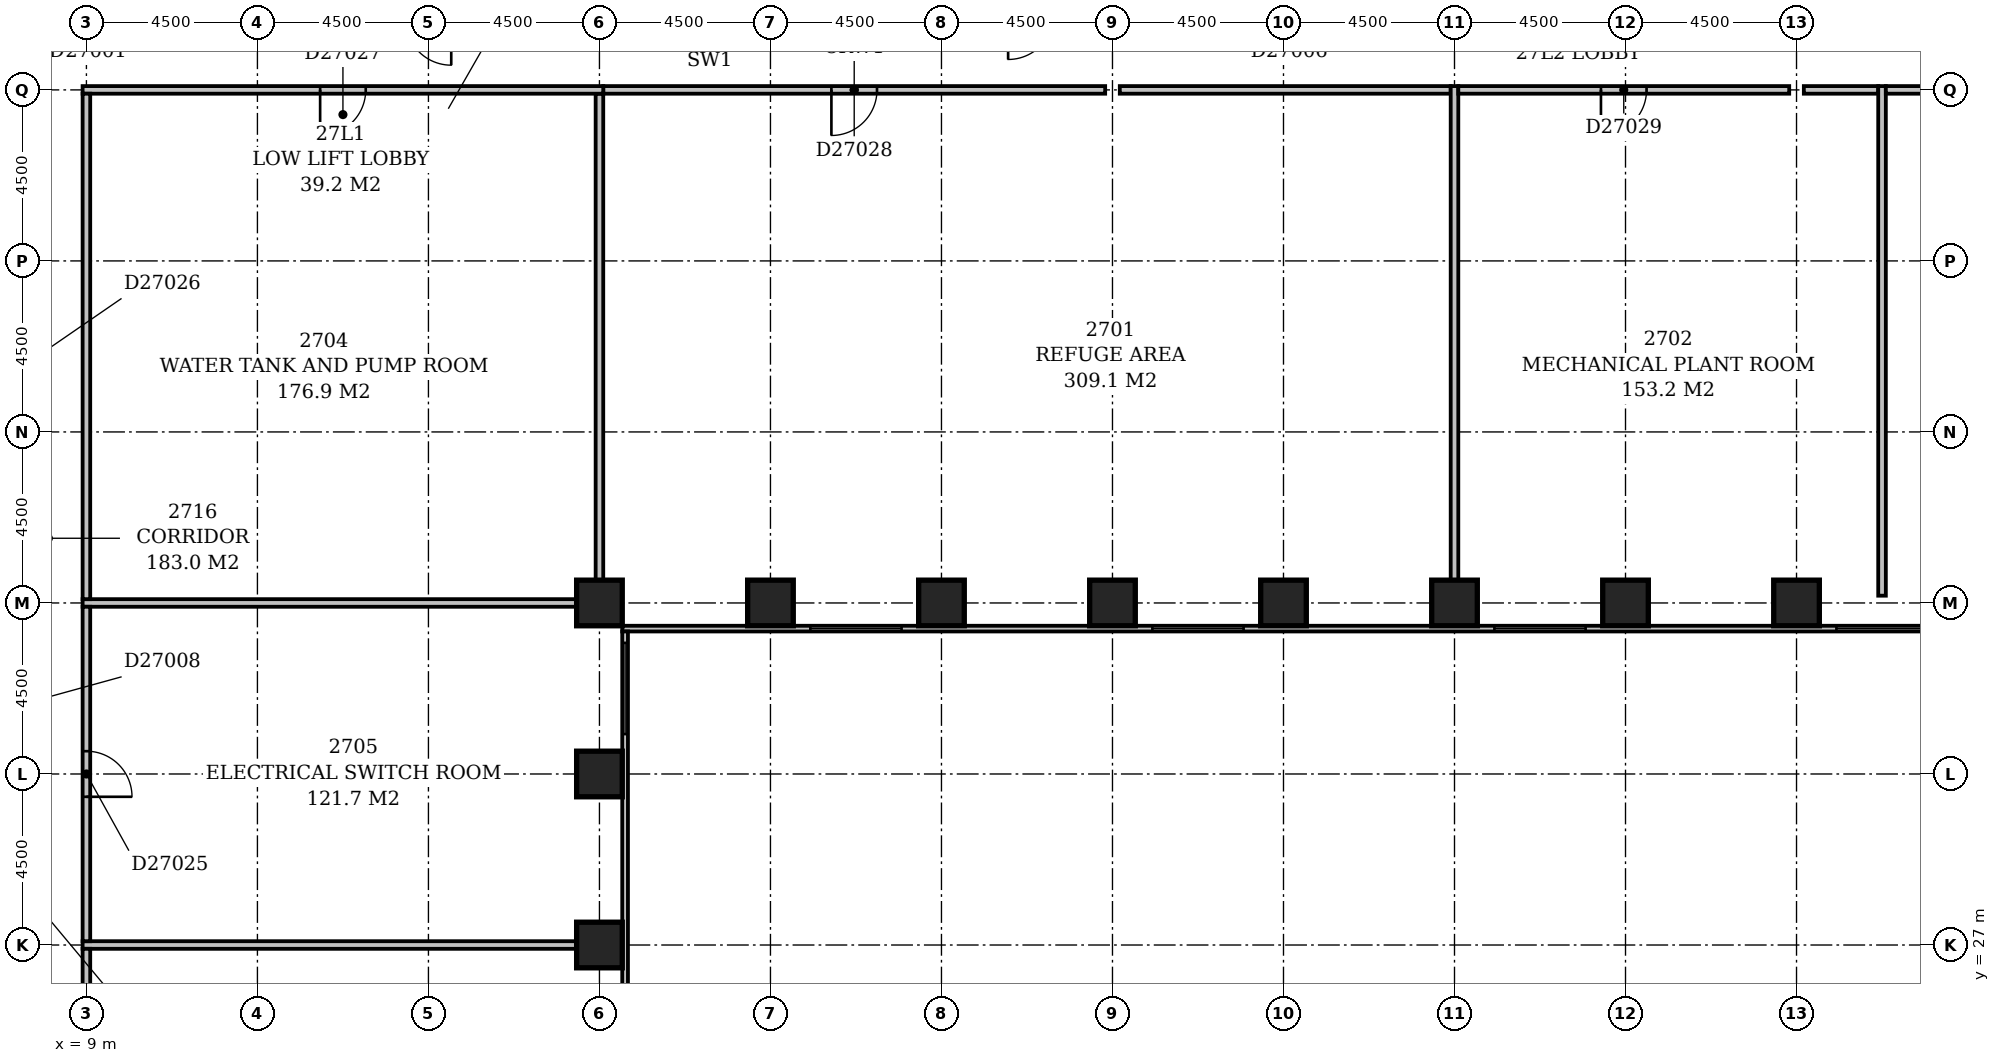
"""IFC4 building model, lengths in metres.
Left out: names, types, materials, properties, quantities, classifications, styles, units other than length and angle.
Written with IfcOpenShell. Run it as: python <this file> out.ifc"""

import sys

from ifc_helpers import new_model, si_unit, direction, frame, frame_2d, origin, origin_2d, place, context, subcontext, project, spatial, rectangle, extrude, element, fill, save


model = new_model("IFC4")
c1 = context("Model", 3, precision=1e-05, world=origin(), true_north=direction((0.0, 1.0)))
c2 = subcontext(c1, "Body", "Model", "MODEL_VIEW")
j1 = project(units=[si_unit("LENGTHUNIT", "METRE"), si_unit("PLANEANGLEUNIT", "RADIAN")], contexts=[c1])
p1 = place(None, origin())
s1 = spatial("IfcSite", under=j1, at=p1, CompositionType="ELEMENT")
p2 = place(p1, origin())
s2 = spatial("IfcBuilding", under=s1, at=p2, CompositionType="ELEMENT")
p3 = place(p2, frame((0.0, 0.0, 108.2)))
s3 = spatial("IfcBuildingStorey", under=s2, at=p3, CompositionType="ELEMENT", Elevation=108.2)
for number, where, z_axis, x_axis in (
    (1, (22.5, 27.0, -0.45), (0.0, 0.0, 1.0), (1.0, 0.0, 0.0)),
    (2, (22.5, 31.5, -0.45), (0.0, 0.0, 1.0), (1.0, 0.0, 0.0)),
    (3, (22.5, 36.0, -0.45), (0.0, 0.0, 1.0), (1.0, 0.0, 0.0)),
    (4, (27.0, 36.0, -0.45), (0.0, 0.0, 1.0), (1.0, 0.0, 0.0)),
    (5, (31.5, 36.0, -0.45), (0.0, 0.0, 1.0), (1.0, 0.0, 0.0)),
    (6, (36.0, 36.0, -0.45), (0.0, 0.0, 1.0), (1.0, 0.0, 0.0)),
    (7, (40.5, 36.0, -0.45), (0.0, 0.0, 1.0), (1.0, 0.0, 0.0)),
    (8, (45.0, 36.0, -0.45), (0.0, 0.0, 1.0), (1.0, 0.0, 0.0)),
    (9, (49.5, 36.0, -0.45), (0.0, 0.0, 1.0), (1.0, 0.0, 0.0)),
    (10, (54.0, 36.0, -0.45), (0.0, 0.0, 1.0), (1.0, 0.0, 0.0)),
):
    element("IfcColumn", number, at=place(p3, frame(where, z_axis=z_axis, x_axis=x_axis)), inside=s3, PredefinedType="COLUMN", context=c2, shape_type="SweptSolid", body=[
        extrude(rectangle(XDim=1.2, YDim=1.2, at=origin_2d()), origin(), (0.0, 0.0, 1.0), 5.35),
    ])
p4 = place(p3, frame((23.175, 17.4, 0.0), z_axis=(0.0, 0.0, 1.0), x_axis=(0.0, 1.0, 0.0)))
e11 = element("IfcWall", 11, at=p4, inside=s3, PredefinedType="STANDARD", context=c2, shape_type="SweptSolid", body=[
    extrude(rectangle(XDim=17.85, YDim=0.15, at=frame_2d((8.925, 0.0))), origin(), (0.0, 0.0, 1.0), 4.3),
])
p5 = place(p4, frame((6.15, 0.0, 0.6)))
e12 = element("IfcOpeningElement", 12, at=p5, cuts=e11, PredefinedType="OPENING", context=c2, shape_type="SweptSolid", body=[
    extrude(rectangle(XDim=2.4, YDim=2.4, at=frame_2d((1.2, 1.2))), frame((0.0, 0.087, 0.0), z_axis=(0.0, -1.0, 0.0), x_axis=(1.0, 0.0, 0.0)), (0.0, 0.0, 1.0), 0.174),
])
p6 = place(p4, frame((15.15, 0.0, 0.6)))
e13 = element("IfcOpeningElement", 13, at=p6, cuts=e11, PredefinedType="OPENING", context=c2, shape_type="SweptSolid", body=[
    extrude(rectangle(XDim=2.4, YDim=2.4, at=frame_2d((1.2, 1.2))), frame((0.0, 0.087, 0.0), z_axis=(0.0, -1.0, 0.0), x_axis=(1.0, 0.0, 0.0)), (0.0, 0.0, 1.0), 0.174),
])
p7 = place(p3, frame((23.1, 35.325, 0.0), z_axis=(0.0, 0.0, 1.0), x_axis=(1.0, 0.0, 0.0)))
e14 = element("IfcWall", 14, at=p7, inside=s3, PredefinedType="STANDARD", context=c2, shape_type="SweptSolid", body=[
    extrude(rectangle(XDim=45.15, YDim=0.15, at=frame_2d((22.575, 0.0))), origin(), (0.0, 0.0, 1.0), 4.3),
])
p8 = place(p7, frame((4.95, 0.0, 0.6)))
e15 = element("IfcOpeningElement", 15, at=p8, cuts=e14, PredefinedType="OPENING", context=c2, shape_type="SweptSolid", body=[
    extrude(rectangle(XDim=2.4, YDim=2.4, at=frame_2d((1.2, 1.2))), frame((0.0, 0.087, 0.0), z_axis=(0.0, -1.0, 0.0), x_axis=(1.0, 0.0, 0.0)), (0.0, 0.0, 1.0), 0.174),
])
p9 = place(p7, frame((13.95, 0.0, 0.6)))
e16 = element("IfcOpeningElement", 16, at=p9, cuts=e14, PredefinedType="OPENING", context=c2, shape_type="SweptSolid", body=[
    extrude(rectangle(XDim=2.4, YDim=2.4, at=frame_2d((1.2, 1.2))), frame((0.0, 0.087, 0.0), z_axis=(0.0, -1.0, 0.0), x_axis=(1.0, 0.0, 0.0)), (0.0, 0.0, 1.0), 0.174),
])
p10 = place(p7, frame((22.95, 0.0, 0.6)))
e17 = element("IfcOpeningElement", 17, at=p10, cuts=e14, PredefinedType="OPENING", context=c2, shape_type="SweptSolid", body=[
    extrude(rectangle(XDim=2.4, YDim=2.4, at=frame_2d((1.2, 1.2))), frame((0.0, 0.087, 0.0), z_axis=(0.0, -1.0, 0.0), x_axis=(1.0, 0.0, 0.0)), (0.0, 0.0, 1.0), 0.174),
])
p11 = place(p7, frame((31.95, 0.0, 0.6)))
e18 = element("IfcOpeningElement", 18, at=p11, cuts=e14, PredefinedType="OPENING", context=c2, shape_type="SweptSolid", body=[
    extrude(rectangle(XDim=2.4, YDim=2.4, at=frame_2d((1.2, 1.2))), frame((0.0, 0.087, 0.0), z_axis=(0.0, -1.0, 0.0), x_axis=(1.0, 0.0, 0.0)), (0.0, 0.0, 1.0), 0.174),
])
p12 = place(p7, frame((40.95, 0.0, 0.6)))
e19 = element("IfcOpeningElement", 19, at=p12, cuts=e14, PredefinedType="OPENING", context=c2, shape_type="SweptSolid", body=[
    extrude(rectangle(XDim=2.4, YDim=2.4, at=frame_2d((1.2, 1.2))), frame((0.0, 0.087, 0.0), z_axis=(0.0, -1.0, 0.0), x_axis=(1.0, 0.0, 0.0)), (0.0, 0.0, 1.0), 0.174),
])
p13 = place(p3, frame((9.0, 18.49, 0.0), z_axis=(0.0, 0.0, 1.0), x_axis=(0.0, 1.0, 0.0)))
e20 = element("IfcWall", 20, at=p13, inside=s3, PredefinedType="PARTITIONING", context=c2, shape_type="SweptSolid", body=[
    extrude(rectangle(XDim=8.409, YDim=0.2, at=frame_2d((4.205, 0.0))), origin(), (0.0, 0.0, 1.0), 4.9),
])
p14 = place(p13, frame((3.605, 0.0, 0.0)))
e21 = element("IfcOpeningElement", 21, at=p14, cuts=e20, PredefinedType="OPENING", context=c2, shape_type="SweptSolid", body=[
    extrude(rectangle(XDim=1.2, YDim=2.1, at=frame_2d((0.6, 1.05))), frame((0.0, 0.112, 0.0), z_axis=(0.0, -1.0, 0.0), x_axis=(1.0, 0.0, 0.0)), (0.0, 0.0, 1.0), 0.224),
])
p15 = place(p3, frame((9.0, 27.1, 0.0), z_axis=(0.0, 0.0, 1.0), x_axis=(0.0, 1.0, 0.0)))
e22 = element("IfcWall", 22, at=p15, inside=s3, PredefinedType="PARTITIONING", context=c2, shape_type="SweptSolid", body=[
    extrude(rectangle(XDim=8.8, YDim=0.2, at=frame_2d((4.4, 0.0))), origin(), (0.0, 0.0, 1.0), 4.9),
])
p16 = place(p15, frame((3.8, 0.0, 0.0)))
e23 = element("IfcOpeningElement", 23, at=p16, cuts=e22, PredefinedType="OPENING", context=c2, shape_type="SweptSolid", body=[
    extrude(rectangle(XDim=1.2, YDim=2.1, at=frame_2d((0.6, 1.05))), frame((0.0, 0.112, 0.0), z_axis=(0.0, -1.0, 0.0), x_axis=(1.0, 0.0, 0.0)), (0.0, 0.0, 1.0), 0.224),
])
p17 = place(p3, frame((22.309, 27.0, 0.0), z_axis=(0.0, 0.0, 1.0), x_axis=(-1.0, 0.0, 0.0)))
e24 = element("IfcWall", 24, at=p17, inside=s3, PredefinedType="PARTITIONING", context=c2, shape_type="SweptSolid", body=[
    extrude(rectangle(XDim=13.409, YDim=0.2, at=frame_2d((6.704, 0.0))), origin(), (0.0, 0.0, 1.0), 4.3),
])
p18 = place(p3, frame((9.0, 36.1, 0.0), z_axis=(0.0, 0.0, 1.0), x_axis=(0.0, 1.0, 0.0)))
e25 = element("IfcWall", 25, at=p18, inside=s3, PredefinedType="PARTITIONING", context=c2, shape_type="SweptSolid", body=[
    extrude(rectangle(XDim=13.3, YDim=0.2, at=frame_2d((6.65, 0.0))), origin(), (0.0, 0.0, 1.0), 4.9),
])
p19 = place(p3, frame((22.309, 36.0, 0.0), z_axis=(0.0, 0.0, 1.0), x_axis=(-1.0, 0.0, 0.0)))
e26 = element("IfcWall", 26, at=p19, inside=s3, PredefinedType="PARTITIONING", context=c2, shape_type="SweptSolid", body=[
    extrude(rectangle(XDim=13.409, YDim=0.2, at=frame_2d((6.704, 0.0))), origin(), (0.0, 0.0, 1.0), 4.9),
])
p20 = place(p3, frame((22.5, 36.191, 0.0), z_axis=(0.0, 0.0, 1.0), x_axis=(0.0, 1.0, 0.0)))
e27 = element("IfcWall", 27, at=p20, inside=s3, PredefinedType="PARTITIONING", context=c2, shape_type="SweptSolid", body=[
    extrude(rectangle(XDim=13.208, YDim=0.2, at=frame_2d((6.604, 0.0))), origin(), (0.0, 0.0, 1.0), 4.9),
])
p21 = place(p3, frame((8.9, 49.5, 0.0), z_axis=(0.0, 0.0, 1.0), x_axis=(1.0, 0.0, 0.0)))
e28 = element("IfcWall", 28, at=p21, inside=s3, PredefinedType="PARTITIONING", context=c2, shape_type="SweptSolid", body=[
    extrude(rectangle(XDim=13.7, YDim=0.2, at=frame_2d((6.85, 0.0))), origin(), (0.0, 0.0, 1.0), 4.9),
])
p22 = place(p21, frame((6.25, 0.0, 0.0)))
e29 = element("IfcOpeningElement", 29, at=p22, cuts=e28, PredefinedType="OPENING", context=c2, shape_type="SweptSolid", body=[
    extrude(rectangle(XDim=1.2, YDim=2.1, at=frame_2d((0.6, 1.05))), frame((0.0, 0.112, 0.0), z_axis=(0.0, -1.0, 0.0), x_axis=(1.0, 0.0, 0.0)), (0.0, 0.0, 1.0), 0.224),
])
p23 = place(p3, frame((22.6, 49.5, 0.0), z_axis=(0.0, 0.0, 1.0), x_axis=(1.0, 0.0, 0.0)))
e30 = element("IfcWall", 30, at=p23, inside=s3, PredefinedType="PARTITIONING", context=c2, shape_type="SweptSolid", body=[
    extrude(rectangle(XDim=13.208, YDim=0.2, at=frame_2d((6.604, 0.0))), origin(), (0.0, 0.0, 1.0), 4.9),
])
p24 = place(p23, frame((6.004, 0.0, 0.0)))
e31 = element("IfcOpeningElement", 31, at=p24, cuts=e30, PredefinedType="OPENING", context=c2, shape_type="SweptSolid", body=[
    extrude(rectangle(XDim=1.2, YDim=2.1, at=frame_2d((0.6, 1.05))), frame((0.0, 0.112, 0.0), z_axis=(0.0, -1.0, 0.0), x_axis=(1.0, 0.0, 0.0)), (0.0, 0.0, 1.0), 0.224),
])
p25 = place(p3, frame((36.192, 49.5, 0.0), z_axis=(0.0, 0.0, 1.0), x_axis=(1.0, 0.0, 0.0)))
e32 = element("IfcWall", 32, at=p25, inside=s3, PredefinedType="PARTITIONING", context=c2, shape_type="SweptSolid", body=[
    extrude(rectangle(XDim=8.708, YDim=0.2, at=frame_2d((4.354, 0.0))), origin(), (0.0, 0.0, 1.0), 4.9),
])
p26 = place(p3, frame((45.0, 49.6, 0.0), z_axis=(0.0, 0.0, 1.0), x_axis=(0.0, -1.0, 0.0)))
e33 = element("IfcWall", 33, at=p26, inside=s3, PredefinedType="PARTITIONING", context=c2, shape_type="SweptSolid", body=[
    extrude(rectangle(XDim=13.409, YDim=0.2, at=frame_2d((6.704, 0.0))), origin(), (0.0, 0.0, 1.0), 4.2),
])
p27 = place(p3, frame((45.1, 49.5, 0.0), z_axis=(0.0, 0.0, 1.0), x_axis=(1.0, 0.0, 0.0)))
e34 = element("IfcWall", 34, at=p27, inside=s3, PredefinedType="PARTITIONING", context=c2, shape_type="SweptSolid", body=[
    extrude(rectangle(XDim=8.708, YDim=0.2, at=frame_2d((4.354, 0.0))), origin(), (0.0, 0.0, 1.0), 4.9),
])
p28 = place(p27, frame((3.754, 0.0, 0.0)))
e35 = element("IfcOpeningElement", 35, at=p28, cuts=e34, PredefinedType="OPENING", context=c2, shape_type="SweptSolid", body=[
    extrude(rectangle(XDim=1.2, YDim=2.1, at=frame_2d((0.6, 1.05))), frame((0.0, 0.112, 0.0), z_axis=(0.0, -1.0, 0.0), x_axis=(1.0, 0.0, 0.0)), (0.0, 0.0, 1.0), 0.224),
])
p29 = place(p3, frame((54.192, 49.5, 0.0), z_axis=(0.0, 0.0, 1.0), x_axis=(1.0, 0.0, 0.0)))
e36 = element("IfcWall", 36, at=p29, inside=s3, PredefinedType="PARTITIONING", context=c2, shape_type="SweptSolid", body=[
    extrude(rectangle(XDim=1.958, YDim=0.2, at=frame_2d((0.979, 0.0))), origin(), (0.0, 0.0, 1.0), 4.9),
])
p30 = place(p3, frame((56.25, 49.6, 0.0), z_axis=(0.0, 0.0, 1.0), x_axis=(0.0, -1.0, 0.0)))
e37 = element("IfcWall", 37, at=p30, inside=s3, PredefinedType="PARTITIONING", context=c2, shape_type="SweptSolid", body=[
    extrude(rectangle(XDim=13.409, YDim=0.2, at=frame_2d((6.704, 0.0))), origin(), (0.0, 0.0, 1.0), 4.9),
])
p31 = place(p3, frame((56.35, 49.5, 0.0), z_axis=(0.0, 0.0, 1.0), x_axis=(1.0, 0.0, 0.0)))
e38 = element("IfcWall", 38, at=p31, inside=s3, PredefinedType="PARTITIONING", context=c2, shape_type="SweptSolid", body=[
    extrude(rectangle(XDim=10.958, YDim=0.2, at=frame_2d((5.479, 0.0))), origin(), (0.0, 0.0, 1.0), 4.9),
])
p32 = place(p31, frame((4.829, 0.0, 0.0)))
e39 = element("IfcOpeningElement", 39, at=p32, cuts=e38, PredefinedType="OPENING", context=c2, shape_type="SweptSolid", body=[
    extrude(rectangle(XDim=1.2, YDim=2.1, at=frame_2d((0.6, 1.05))), frame((0.0, 0.112, 0.0), z_axis=(0.0, -1.0, 0.0), x_axis=(1.0, 0.0, 0.0)), (0.0, 0.0, 1.0), 0.224),
])
p33 = place(p6, origin())
e40 = element("IfcWindow", 40, at=p33, inside=s3, PartitioningType="SINGLE_PANEL", PredefinedType="USERDEFINED", context=c2, shape_type="SweptSolid", body=[
    extrude(rectangle(XDim=2.4, YDim=2.4, at=frame_2d((1.2, 1.2))), frame((0.0, 0.03, 0.0), z_axis=(0.0, -1.0, 0.0), x_axis=(1.0, 0.0, 0.0)), (0.0, 0.0, 1.0), 0.06),
])
fill(e13, e40)
p34 = place(p8, origin())
e41 = element("IfcWindow", 41, at=p34, inside=s3, PartitioningType="SINGLE_PANEL", PredefinedType="USERDEFINED", context=c2, shape_type="SweptSolid", body=[
    extrude(rectangle(XDim=2.4, YDim=2.4, at=frame_2d((1.2, 1.2))), frame((0.0, 0.03, 0.0), z_axis=(0.0, -1.0, 0.0), x_axis=(1.0, 0.0, 0.0)), (0.0, 0.0, 1.0), 0.06),
])
fill(e15, e41)
p35 = place(p9, origin())
e42 = element("IfcWindow", 42, at=p35, inside=s3, PartitioningType="SINGLE_PANEL", PredefinedType="USERDEFINED", context=c2, shape_type="SweptSolid", body=[
    extrude(rectangle(XDim=2.4, YDim=2.4, at=frame_2d((1.2, 1.2))), frame((0.0, 0.03, 0.0), z_axis=(0.0, -1.0, 0.0), x_axis=(1.0, 0.0, 0.0)), (0.0, 0.0, 1.0), 0.06),
])
fill(e16, e42)
p36 = place(p10, origin())
e43 = element("IfcWindow", 43, at=p36, inside=s3, PartitioningType="SINGLE_PANEL", PredefinedType="USERDEFINED", context=c2, shape_type="SweptSolid", body=[
    extrude(rectangle(XDim=2.4, YDim=2.4, at=frame_2d((1.2, 1.2))), frame((0.0, 0.03, 0.0), z_axis=(0.0, -1.0, 0.0), x_axis=(1.0, 0.0, 0.0)), (0.0, 0.0, 1.0), 0.06),
])
fill(e17, e43)
p37 = place(p11, origin())
e44 = element("IfcWindow", 44, at=p37, inside=s3, PartitioningType="SINGLE_PANEL", PredefinedType="USERDEFINED", context=c2, shape_type="SweptSolid", body=[
    extrude(rectangle(XDim=2.4, YDim=2.4, at=frame_2d((1.2, 1.2))), frame((0.0, 0.03, 0.0), z_axis=(0.0, -1.0, 0.0), x_axis=(1.0, 0.0, 0.0)), (0.0, 0.0, 1.0), 0.06),
])
fill(e18, e44)
p38 = place(p16, frame((1.2, 0.0, 0.0), z_axis=(0.0, 0.0, 1.0), x_axis=(-1.0, 0.0, 0.0)))
e45 = element("IfcDoor", 45, at=p38, inside=s3, OperationType="SINGLE_SWING_RIGHT", PredefinedType="DOOR", context=c2, shape_type="SweptSolid", body=[
    extrude(rectangle(XDim=1.2, YDim=2.1, at=frame_2d((0.6, 1.05))), frame((0.0, 0.025, 0.0), z_axis=(0.0, -1.0, 0.0), x_axis=(1.0, 0.0, 0.0)), (0.0, 0.0, 1.0), 0.05),
])
fill(e23, e45)
p39 = place(p22, frame((1.2, 0.0, 0.0), z_axis=(0.0, 0.0, 1.0), x_axis=(-1.0, 0.0, 0.0)))
e46 = element("IfcDoor", 46, at=p39, inside=s3, OperationType="SINGLE_SWING_RIGHT", PredefinedType="DOOR", context=c2, shape_type="SweptSolid", body=[
    extrude(rectangle(XDim=1.2, YDim=2.1, at=frame_2d((0.6, 1.05))), frame((0.0, 0.025, 0.0), z_axis=(0.0, -1.0, 0.0), x_axis=(1.0, 0.0, 0.0)), (0.0, 0.0, 1.0), 0.05),
])
fill(e29, e46)
p40 = place(p24, frame((1.2, 0.0, 0.0), z_axis=(0.0, 0.0, 1.0), x_axis=(-1.0, 0.0, 0.0)))
e47 = element("IfcDoor", 47, at=p40, inside=s3, OperationType="SINGLE_SWING_RIGHT", PredefinedType="DOOR", context=c2, shape_type="SweptSolid", body=[
    extrude(rectangle(XDim=1.2, YDim=2.1, at=frame_2d((0.6, 1.05))), frame((0.0, 0.025, 0.0), z_axis=(0.0, -1.0, 0.0), x_axis=(1.0, 0.0, 0.0)), (0.0, 0.0, 1.0), 0.05),
])
fill(e31, e47)
p41 = place(p28, frame((1.2, 0.0, 0.0), z_axis=(0.0, 0.0, 1.0), x_axis=(-1.0, 0.0, 0.0)))
e48 = element("IfcDoor", 48, at=p41, inside=s3, OperationType="SINGLE_SWING_RIGHT", PredefinedType="DOOR", context=c2, shape_type="SweptSolid", body=[
    extrude(rectangle(XDim=1.2, YDim=2.1, at=frame_2d((0.6, 1.05))), frame((0.0, 0.025, 0.0), z_axis=(0.0, -1.0, 0.0), x_axis=(1.0, 0.0, 0.0)), (0.0, 0.0, 1.0), 0.05),
])
fill(e35, e48)
save(model, sys.argv[1])
